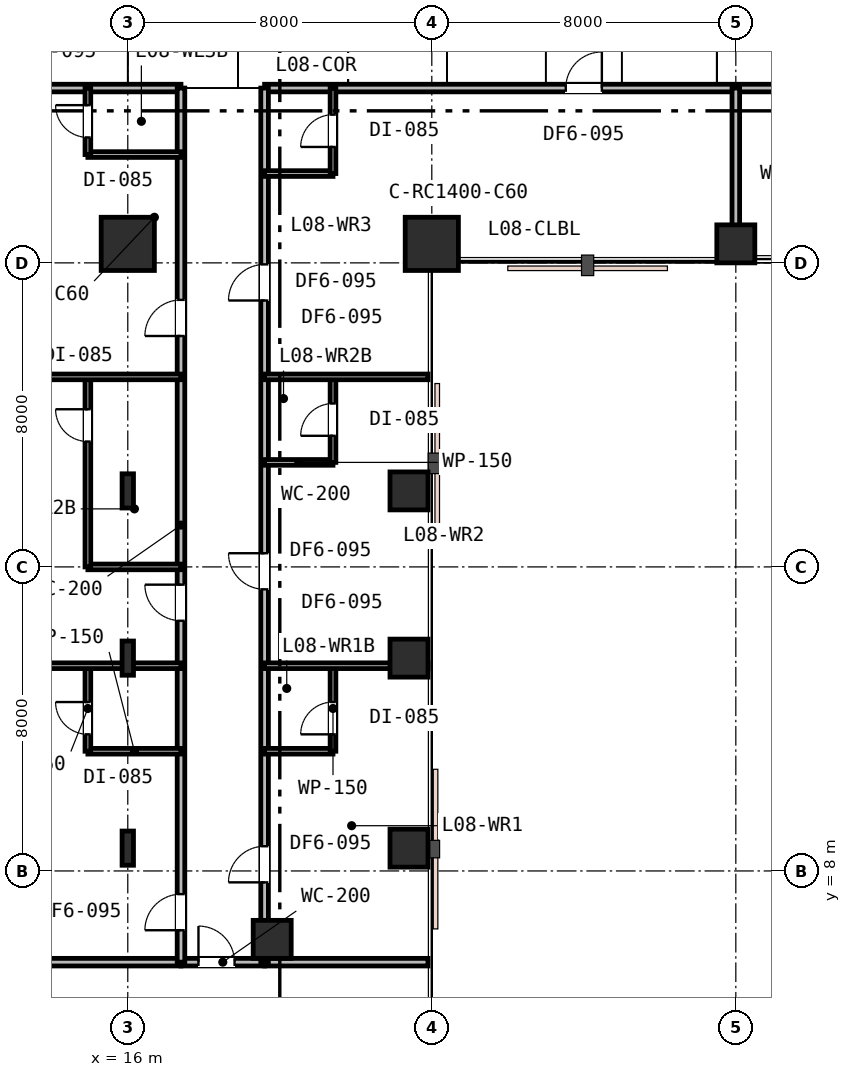
"""IFC4 building model, lengths in metres.
Left out: names, types, materials, properties, quantities, classifications, styles, units other than length and angle.
Written with IfcOpenShell. Run it as: python <this file> out.ifc"""

import sys

from ifc_helpers import new_model, si_unit, direction, frame, frame_2d, origin, origin_2d, place, context, subcontext, project, spatial, rectangle, i_section, extrude, element, fill, save


model = new_model("IFC4")
c1 = context("Model", 3, precision=1e-05, world=origin(), true_north=direction((0.0, 1.0)))
c2 = subcontext(c1, "Body", "Model", "MODEL_VIEW")
j1 = project(units=[si_unit("LENGTHUNIT", "METRE"), si_unit("PLANEANGLEUNIT", "RADIAN")], contexts=[c1])
p1 = place(None, origin())
s1 = spatial("IfcSite", under=j1, at=p1, CompositionType="ELEMENT")
p2 = place(p1, origin())
s2 = spatial("IfcBuilding", under=s1, at=p2, CompositionType="ELEMENT")
p3 = place(p2, frame((0.0, 0.0, 36.6)))
s3 = spatial("IfcBuildingStorey", under=s2, at=p3, CompositionType="ELEMENT", Elevation=36.6)
for number, where, z_axis, x_axis in (
    (1, (16.0, 24.5, 0.0), (0.0, 0.0, 1.0), (1.0, 0.0, 0.0)),
    (2, (24.0, 24.5, 0.0), (0.0, 0.0, 1.0), (1.0, 0.0, 0.0)),
):
    element("IfcColumn", number, at=place(p3, frame(where, z_axis=z_axis, x_axis=x_axis)), inside=s3, PredefinedType="COLUMN", context=c2, shape_type="SweptSolid", body=[
        extrude(rectangle(XDim=1.4, YDim=1.4, at=origin_2d()), origin(), (0.0, 0.0, 1.0), 3.6),
    ])
for number, where, z_axis, x_axis in (
    (3, (32.0, 24.5, 0.0), (0.0, 0.0, 1.0), (1.0, 0.0, 0.0)),
    (4, (19.8, 6.2, 0.0), (0.0, 0.0, 1.0), (1.0, 0.0, 0.0)),
    (5, (23.4, 8.6, 0.0), (0.0, 0.0, 1.0), (1.0, 0.0, 0.0)),
    (6, (23.4, 13.6, 0.0), (0.0, 0.0, 1.0), (1.0, 0.0, 0.0)),
    (7, (23.4, 18.0, 0.0), (0.0, 0.0, 1.0), (1.0, 0.0, 0.0)),
):
    element("IfcColumn", number, at=place(p3, frame(where, z_axis=z_axis, x_axis=x_axis)), inside=s3, PredefinedType="COLUMN", context=c2, shape_type="SweptSolid", body=[
        extrude(rectangle(XDim=1.0, YDim=1.0, at=origin_2d()), origin(), (0.0, 0.0, 1.0), 3.6),
    ])
for number, where, z_axis, x_axis in (
    (8, (16.0, 8.6, 0.0), (0.0, 0.0, 1.0), (1.0, 0.0, 0.0)),
    (9, (16.0, 13.6, 0.0), (0.0, 0.0, 1.0), (1.0, 0.0, 0.0)),
    (10, (16.0, 18.0, 0.0), (0.0, 0.0, 1.0), (1.0, 0.0, 0.0)),
):
    element("IfcColumn", number, at=place(p3, frame(where, z_axis=z_axis, x_axis=x_axis)), inside=s3, PredefinedType="COLUMN", context=c2, shape_type="SweptSolid", body=[
        extrude(i_section(OverallWidth=0.3, OverallDepth=0.9, WebThickness=0.018, FlangeThickness=0.035, FilletRadius=0.03, at=origin_2d()), origin(), (0.0, 0.0, 1.0), 3.6),
    ])
p4 = place(p3, frame((0.1, 28.6, 0.0), z_axis=(0.0, 0.0, 1.0), x_axis=(1.0, 0.0, 0.0)))
e11 = element("IfcWall", 11, at=p4, inside=s3, PredefinedType="PARTITIONING", context=c2, shape_type="SweptSolid", body=[
    extrude(rectangle(XDim=17.3, YDim=0.2, at=frame_2d((8.65, 0.0))), origin(), (0.0, 0.0, 1.0), 2.82),
])
p5 = place(p3, frame((19.6, 28.6, 0.0), z_axis=(0.0, 0.0, 1.0), x_axis=(1.0, 0.0, 0.0)))
e12 = element("IfcWall", 12, at=p5, inside=s3, PredefinedType="PARTITIONING", context=c2, shape_type="SweptSolid", body=[
    extrude(rectangle(XDim=30.8, YDim=0.2, at=frame_2d((15.4, 0.0))), origin(), (0.0, 0.0, 1.0), 2.82),
])
p6 = place(p5, frame((7.925, 0.0, 0.0)))
e13 = element("IfcOpeningElement", 13, at=p6, cuts=e12, PredefinedType="OPENING", context=c2, shape_type="SweptSolid", body=[
    extrude(rectangle(XDim=0.95, YDim=2.15, at=frame_2d((0.475, 1.075))), frame((0.0, 0.11, 0.0), z_axis=(0.0, -1.0, 0.0), x_axis=(1.0, 0.0, 0.0)), (0.0, 0.0, 1.0), 0.22),
])
p7 = place(p5, frame((16.39, 0.0, 0.0)))
e14 = element("IfcOpeningElement", 14, at=p7, cuts=e12, PredefinedType="OPENING", context=c2, shape_type="SweptSolid", body=[
    extrude(rectangle(XDim=0.95, YDim=2.15, at=frame_2d((0.475, 1.075))), frame((0.0, 0.11, 0.0), z_axis=(0.0, -1.0, 0.0), x_axis=(1.0, 0.0, 0.0)), (0.0, 0.0, 1.0), 0.22),
])
p8 = place(p5, frame((26.835, 0.0, 0.0)))
e15 = element("IfcOpeningElement", 15, at=p8, cuts=e12, PredefinedType="OPENING", context=c2, shape_type="SweptSolid", body=[
    extrude(rectangle(XDim=0.95, YDim=2.15, at=frame_2d((0.475, 1.075))), frame((0.0, 0.11, 0.0), z_axis=(0.0, -1.0, 0.0), x_axis=(1.0, 0.0, 0.0)), (0.0, 0.0, 1.0), 0.22),
])
p9 = place(p3, frame((32.0, 24.1, 0.0), z_axis=(0.0, 0.0, 1.0), x_axis=(0.0, 1.0, 0.0)))
e16 = element("IfcWall", 16, at=p9, inside=s3, PredefinedType="PARTITIONING", context=c2, shape_type="SweptSolid", body=[
    extrude(rectangle(XDim=4.5, YDim=0.2, at=frame_2d((2.25, 0.0))), origin(), (0.0, 0.0, 1.0), 2.93),
])
p10 = place(p3, frame((0.1, 5.6, 0.0), z_axis=(0.0, 0.0, 1.0), x_axis=(1.0, 0.0, 0.0)))
e17 = element("IfcWall", 17, at=p10, inside=s3, PredefinedType="PARTITIONING", context=c2, shape_type="SweptSolid", body=[
    extrude(rectangle(XDim=17.3, YDim=0.2, at=frame_2d((8.65, 0.0))), origin(), (0.0, 0.0, 1.0), 2.82),
])
p11 = place(p3, frame((19.6, 5.6, 0.0), z_axis=(0.0, 0.0, 1.0), x_axis=(1.0, 0.0, 0.0)))
e18 = element("IfcWall", 18, at=p11, inside=s3, PredefinedType="PARTITIONING", context=c2, shape_type="SweptSolid", body=[
    extrude(rectangle(XDim=4.3, YDim=0.2, at=frame_2d((2.15, 0.0))), origin(), (0.0, 0.0, 1.0), 3.33),
])
p12 = place(p3, frame((17.4, 5.6, 0.0), z_axis=(0.0, 0.0, 1.0), x_axis=(1.0, 0.0, 0.0)))
e19 = element("IfcWall", 19, at=p12, inside=s3, PredefinedType="PARTITIONING", context=c2, shape_type="SweptSolid", body=[
    extrude(rectangle(XDim=2.2, YDim=0.2, at=frame_2d((1.1, 0.0))), origin(), (0.0, 0.0, 1.0), 3.33),
])
p13 = place(p12, frame((0.46, 0.0, 0.0)))
e20 = element("IfcOpeningElement", 20, at=p13, cuts=e19, PredefinedType="OPENING", context=c2, shape_type="SweptSolid", body=[
    extrude(rectangle(XDim=0.95, YDim=2.15, at=frame_2d((0.475, 1.075))), frame((0.0, 0.11, 0.0), z_axis=(0.0, -1.0, 0.0), x_axis=(1.0, 0.0, 0.0)), (0.0, 0.0, 1.0), 0.22),
])
p14 = place(p3, frame((17.4, 5.6, 0.0), z_axis=(0.0, 0.0, 1.0), x_axis=(0.0, 1.0, 0.0)))
e21 = element("IfcWall", 21, at=p14, inside=s3, PredefinedType="PARTITIONING", context=c2, shape_type="SweptSolid", body=[
    extrude(rectangle(XDim=23.0, YDim=0.2, at=frame_2d((11.5, 0.0))), origin(), (0.0, 0.0, 1.0), 2.82),
])
p15 = place(p14, frame((0.84, 0.0, 0.0)))
e22 = element("IfcOpeningElement", 22, at=p15, cuts=e21, PredefinedType="OPENING", context=c2, shape_type="SweptSolid", body=[
    extrude(rectangle(XDim=0.95, YDim=2.15, at=frame_2d((0.475, 1.075))), frame((0.0, 0.11, 0.0), z_axis=(0.0, -1.0, 0.0), x_axis=(1.0, 0.0, 0.0)), (0.0, 0.0, 1.0), 0.22),
])
p16 = place(p14, frame((8.983, 0.0, 0.0)))
e23 = element("IfcOpeningElement", 23, at=p16, cuts=e21, PredefinedType="OPENING", context=c2, shape_type="SweptSolid", body=[
    extrude(rectangle(XDim=0.95, YDim=2.15, at=frame_2d((0.475, 1.075))), frame((0.0, 0.11, 0.0), z_axis=(0.0, -1.0, 0.0), x_axis=(1.0, 0.0, 0.0)), (0.0, 0.0, 1.0), 0.22),
])
p17 = place(p14, frame((16.476, 0.0, 0.0)))
e24 = element("IfcOpeningElement", 24, at=p17, cuts=e21, PredefinedType="OPENING", context=c2, shape_type="SweptSolid", body=[
    extrude(rectangle(XDim=0.95, YDim=2.15, at=frame_2d((0.475, 1.075))), frame((0.0, 0.11, 0.0), z_axis=(0.0, -1.0, 0.0), x_axis=(1.0, 0.0, 0.0)), (0.0, 0.0, 1.0), 0.22),
])
p18 = place(p3, frame((14.95, 11.15, 0.0), z_axis=(0.0, 0.0, 1.0), x_axis=(1.0, 0.0, 0.0)))
e25 = element("IfcWall", 25, at=p18, inside=s3, PredefinedType="PARTITIONING", context=c2, shape_type="SweptSolid", body=[
    extrude(rectangle(XDim=2.45, YDim=0.15, at=frame_2d((1.225, 0.0))), origin(), (0.0, 0.0, 1.0), 2.82),
])
p19 = place(p3, frame((14.95, 11.15, 0.0), z_axis=(0.0, 0.0, 1.0), x_axis=(0.0, 1.0, 0.0)))
e26 = element("IfcWall", 26, at=p19, inside=s3, PredefinedType="PARTITIONING", context=c2, shape_type="SweptSolid", body=[
    extrude(rectangle(XDim=2.25, YDim=0.15, at=frame_2d((1.125, 0.0))), origin(), (0.0, 0.0, 1.0), 2.82),
])
p20 = place(p19, frame((0.444, 0.0, 0.0)))
e27 = element("IfcOpeningElement", 27, at=p20, cuts=e26, PredefinedType="OPENING", context=c2, shape_type="SweptSolid", body=[
    extrude(rectangle(XDim=0.85, YDim=2.15, at=frame_2d((0.425, 1.075))), frame((0.0, 0.085, 0.0), z_axis=(0.0, -1.0, 0.0), x_axis=(1.0, 0.0, 0.0)), (0.0, 0.0, 1.0), 0.17),
])
p21 = place(p3, frame((0.1, 13.4, 0.0), z_axis=(0.0, 0.0, 1.0), x_axis=(1.0, 0.0, 0.0)))
e28 = element("IfcWall", 28, at=p21, inside=s3, PredefinedType="PARTITIONING", context=c2, shape_type="SweptSolid", body=[
    extrude(rectangle(XDim=17.3, YDim=0.15, at=frame_2d((8.65, 0.0))), origin(), (0.0, 0.0, 1.0), 2.82),
])
p22 = place(p3, frame((19.6, 5.6, 0.0), z_axis=(0.0, 0.0, 1.0), x_axis=(0.0, 1.0, 0.0)))
e29 = element("IfcWall", 29, at=p22, inside=s3, PredefinedType="PARTITIONING", context=c2, shape_type="SweptSolid", body=[
    extrude(rectangle(XDim=23.0, YDim=0.2, at=frame_2d((11.5, 0.0))), origin(), (0.0, 0.0, 1.0), 2.82),
])
p23 = place(p22, frame((2.1, 0.0, 0.0)))
e30 = element("IfcOpeningElement", 30, at=p23, cuts=e29, PredefinedType="OPENING", context=c2, shape_type="SweptSolid", body=[
    extrude(rectangle(XDim=0.95, YDim=2.15, at=frame_2d((0.475, 1.075))), frame((0.0, 0.11, 0.0), z_axis=(0.0, -1.0, 0.0), x_axis=(1.0, 0.0, 0.0)), (0.0, 0.0, 1.0), 0.22),
])
p24 = place(p22, frame((9.81, 0.0, 0.0)))
e31 = element("IfcOpeningElement", 31, at=p24, cuts=e29, PredefinedType="OPENING", context=c2, shape_type="SweptSolid", body=[
    extrude(rectangle(XDim=0.95, YDim=2.15, at=frame_2d((0.475, 1.075))), frame((0.0, 0.11, 0.0), z_axis=(0.0, -1.0, 0.0), x_axis=(1.0, 0.0, 0.0)), (0.0, 0.0, 1.0), 0.22),
])
p25 = place(p22, frame((17.41, 0.0, 0.0)))
e32 = element("IfcOpeningElement", 32, at=p25, cuts=e29, PredefinedType="OPENING", context=c2, shape_type="SweptSolid", body=[
    extrude(rectangle(XDim=0.95, YDim=2.15, at=frame_2d((0.475, 1.075))), frame((0.0, 0.11, 0.0), z_axis=(0.0, -1.0, 0.0), x_axis=(1.0, 0.0, 0.0)), (0.0, 0.0, 1.0), 0.22),
])
p26 = place(p3, frame((19.6, 11.15, 0.0), z_axis=(0.0, 0.0, 1.0), x_axis=(1.0, 0.0, 0.0)))
e33 = element("IfcWall", 33, at=p26, inside=s3, PredefinedType="PARTITIONING", context=c2, shape_type="SweptSolid", body=[
    extrude(rectangle(XDim=1.8, YDim=0.15, at=frame_2d((0.9, 0.0))), origin(), (0.0, 0.0, 1.0), 2.96),
])
p27 = place(p3, frame((21.4, 11.15, 0.0), z_axis=(0.0, 0.0, 1.0), x_axis=(0.0, 1.0, 0.0)))
e34 = element("IfcWall", 34, at=p27, inside=s3, PredefinedType="PARTITIONING", context=c2, shape_type="SweptSolid", body=[
    extrude(rectangle(XDim=2.25, YDim=0.15, at=frame_2d((1.125, 0.0))), origin(), (0.0, 0.0, 1.0), 2.82),
])
p28 = place(p27, frame((0.444, 0.0, 0.0)))
e35 = element("IfcOpeningElement", 35, at=p28, cuts=e34, PredefinedType="OPENING", context=c2, shape_type="SweptSolid", body=[
    extrude(rectangle(XDim=0.85, YDim=2.15, at=frame_2d((0.425, 1.075))), frame((0.0, 0.085, 0.0), z_axis=(0.0, -1.0, 0.0), x_axis=(1.0, 0.0, 0.0)), (0.0, 0.0, 1.0), 0.17),
])
p29 = place(p3, frame((19.6, 13.4, 0.0), z_axis=(0.0, 0.0, 1.0), x_axis=(1.0, 0.0, 0.0)))
e36 = element("IfcWall", 36, at=p29, inside=s3, PredefinedType="PARTITIONING", context=c2, shape_type="SweptSolid", body=[
    extrude(rectangle(XDim=4.3, YDim=0.15, at=frame_2d((2.15, 0.0))), origin(), (0.0, 0.0, 1.0), 2.82),
])
p30 = place(p3, frame((14.95, 16.0, 0.0), z_axis=(0.0, 0.0, 1.0), x_axis=(1.0, 0.0, 0.0)))
e37 = element("IfcWall", 37, at=p30, inside=s3, PredefinedType="PARTITIONING", context=c2, shape_type="SweptSolid", body=[
    extrude(rectangle(XDim=2.45, YDim=0.15, at=frame_2d((1.225, 0.0))), origin(), (0.0, 0.0, 1.0), 2.82),
])
p31 = place(p3, frame((14.95, 16.0, 0.0), z_axis=(0.0, 0.0, 1.0), x_axis=(0.0, 1.0, 0.0)))
e38 = element("IfcWall", 38, at=p31, inside=s3, PredefinedType="PARTITIONING", context=c2, shape_type="SweptSolid", body=[
    extrude(rectangle(XDim=5.0, YDim=0.15, at=frame_2d((2.5, 0.0))), origin(), (0.0, 0.0, 1.0), 2.82),
])
p32 = place(p31, frame((3.298, 0.0, 0.0)))
e39 = element("IfcOpeningElement", 39, at=p32, cuts=e38, PredefinedType="OPENING", context=c2, shape_type="SweptSolid", body=[
    extrude(rectangle(XDim=0.85, YDim=2.15, at=frame_2d((0.425, 1.075))), frame((0.0, 0.085, 0.0), z_axis=(0.0, -1.0, 0.0), x_axis=(1.0, 0.0, 0.0)), (0.0, 0.0, 1.0), 0.17),
])
p33 = place(p3, frame((0.1, 21.0, 0.0), z_axis=(0.0, 0.0, 1.0), x_axis=(1.0, 0.0, 0.0)))
e40 = element("IfcWall", 40, at=p33, inside=s3, PredefinedType="PARTITIONING", context=c2, shape_type="SweptSolid", body=[
    extrude(rectangle(XDim=17.3, YDim=0.15, at=frame_2d((8.65, 0.0))), origin(), (0.0, 0.0, 1.0), 2.82),
])
p34 = place(p3, frame((19.6, 18.75, 0.0), z_axis=(0.0, 0.0, 1.0), x_axis=(1.0, 0.0, 0.0)))
e41 = element("IfcWall", 41, at=p34, inside=s3, PredefinedType="PARTITIONING", context=c2, shape_type="SweptSolid", body=[
    extrude(rectangle(XDim=1.8, YDim=0.15, at=frame_2d((0.9, 0.0))), origin(), (0.0, 0.0, 1.0), 3.33),
])
p35 = place(p3, frame((21.4, 18.75, 0.0), z_axis=(0.0, 0.0, 1.0), x_axis=(0.0, 1.0, 0.0)))
e42 = element("IfcWall", 42, at=p35, inside=s3, PredefinedType="PARTITIONING", context=c2, shape_type="SweptSolid", body=[
    extrude(rectangle(XDim=2.25, YDim=0.15, at=frame_2d((1.125, 0.0))), origin(), (0.0, 0.0, 1.0), 3.33),
])
p36 = place(p35, frame((0.7, 0.0, 0.0)))
e43 = element("IfcOpeningElement", 43, at=p36, cuts=e42, PredefinedType="OPENING", context=c2, shape_type="SweptSolid", body=[
    extrude(rectangle(XDim=0.85, YDim=2.15, at=frame_2d((0.425, 1.075))), frame((0.0, 0.085, 0.0), z_axis=(0.0, -1.0, 0.0), x_axis=(1.0, 0.0, 0.0)), (0.0, 0.0, 1.0), 0.17),
])
p37 = place(p3, frame((19.6, 21.0, 0.0), z_axis=(0.0, 0.0, 1.0), x_axis=(1.0, 0.0, 0.0)))
e44 = element("IfcWall", 44, at=p37, inside=s3, PredefinedType="PARTITIONING", context=c2, shape_type="SweptSolid", body=[
    extrude(rectangle(XDim=4.3, YDim=0.15, at=frame_2d((2.15, 0.0))), origin(), (0.0, 0.0, 1.0), 3.33),
])
p38 = place(p3, frame((14.95, 26.85, 0.0), z_axis=(0.0, 0.0, 1.0), x_axis=(1.0, 0.0, 0.0)))
e45 = element("IfcWall", 45, at=p38, inside=s3, PredefinedType="PARTITIONING", context=c2, shape_type="SweptSolid", body=[
    extrude(rectangle(XDim=2.45, YDim=0.15, at=frame_2d((1.225, 0.0))), origin(), (0.0, 0.0, 1.0), 2.82),
])
p39 = place(p3, frame((14.95, 26.85, 0.0), z_axis=(0.0, 0.0, 1.0), x_axis=(0.0, 1.0, 0.0)))
e46 = element("IfcWall", 46, at=p39, inside=s3, PredefinedType="PARTITIONING", context=c2, shape_type="SweptSolid", body=[
    extrude(rectangle(XDim=1.75, YDim=0.15, at=frame_2d((0.875, 0.0))), origin(), (0.0, 0.0, 1.0), 3.33),
])
p40 = place(p39, frame((0.45, 0.0, 0.0)))
e47 = element("IfcOpeningElement", 47, at=p40, cuts=e46, PredefinedType="OPENING", context=c2, shape_type="SweptSolid", body=[
    extrude(rectangle(XDim=0.85, YDim=2.15, at=frame_2d((0.425, 1.075))), frame((0.0, 0.085, 0.0), z_axis=(0.0, -1.0, 0.0), x_axis=(1.0, 0.0, 0.0)), (0.0, 0.0, 1.0), 0.17),
])
p41 = place(p3, frame((19.6, 26.35, 0.0), z_axis=(0.0, 0.0, 1.0), x_axis=(1.0, 0.0, 0.0)))
e48 = element("IfcWall", 48, at=p41, inside=s3, PredefinedType="PARTITIONING", context=c2, shape_type="SweptSolid", body=[
    extrude(rectangle(XDim=1.8, YDim=0.15, at=frame_2d((0.9, 0.0))), origin(), (0.0, 0.0, 1.0), 2.96),
])
p42 = place(p3, frame((21.4, 26.35, 0.0), z_axis=(0.0, 0.0, 1.0), x_axis=(0.0, 1.0, 0.0)))
e49 = element("IfcWall", 49, at=p42, inside=s3, PredefinedType="PARTITIONING", context=c2, shape_type="SweptSolid", body=[
    extrude(rectangle(XDim=2.25, YDim=0.15, at=frame_2d((1.125, 0.0))), origin(), (0.0, 0.0, 1.0), 2.96),
])
p43 = place(p42, frame((0.7, 0.0, 0.0)))
e50 = element("IfcOpeningElement", 50, at=p43, cuts=e49, PredefinedType="OPENING", context=c2, shape_type="SweptSolid", body=[
    extrude(rectangle(XDim=0.85, YDim=2.15, at=frame_2d((0.425, 1.075))), frame((0.0, 0.085, 0.0), z_axis=(0.0, -1.0, 0.0), x_axis=(1.0, 0.0, 0.0)), (0.0, 0.0, 1.0), 0.17),
])
p44 = place(p6, origin())
e51 = element("IfcDoor", 51, at=p44, inside=s3, OperationType="SINGLE_SWING_RIGHT", PredefinedType="DOOR", context=c2, shape_type="SweptSolid", body=[
    extrude(rectangle(XDim=0.95, YDim=2.15, at=frame_2d((0.475, 1.075))), frame((0.0, 0.025, 0.0), z_axis=(0.0, -1.0, 0.0), x_axis=(1.0, 0.0, 0.0)), (0.0, 0.0, 1.0), 0.05),
])
fill(e13, e51)
p45 = place(p13, origin())
e52 = element("IfcDoor", 52, at=p45, inside=s3, OperationType="SINGLE_SWING_LEFT", PredefinedType="DOOR", context=c2, shape_type="SweptSolid", body=[
    extrude(rectangle(XDim=0.95, YDim=2.15, at=frame_2d((0.475, 1.075))), frame((0.0, 0.025, 0.0), z_axis=(0.0, -1.0, 0.0), x_axis=(1.0, 0.0, 0.0)), (0.0, 0.0, 1.0), 0.05),
])
fill(e20, e52)
p46 = place(p15, origin())
e53 = element("IfcDoor", 53, at=p46, inside=s3, OperationType="SINGLE_SWING_LEFT", PredefinedType="DOOR", context=c2, shape_type="SweptSolid", body=[
    extrude(rectangle(XDim=0.95, YDim=2.15, at=frame_2d((0.475, 1.075))), frame((0.0, 0.025, 0.0), z_axis=(0.0, -1.0, 0.0), x_axis=(1.0, 0.0, 0.0)), (0.0, 0.0, 1.0), 0.05),
])
fill(e22, e53)
p47 = place(p20, origin())
e54 = element("IfcDoor", 54, at=p47, inside=s3, OperationType="SINGLE_SWING_RIGHT", PredefinedType="DOOR", context=c2, shape_type="SweptSolid", body=[
    extrude(rectangle(XDim=0.85, YDim=2.15, at=frame_2d((0.425, 1.075))), frame((0.0, 0.025, 0.0), z_axis=(0.0, -1.0, 0.0), x_axis=(1.0, 0.0, 0.0)), (0.0, 0.0, 1.0), 0.05),
])
fill(e27, e54)
p48 = place(p23, origin())
e55 = element("IfcDoor", 55, at=p48, inside=s3, OperationType="SINGLE_SWING_LEFT", PredefinedType="DOOR", context=c2, shape_type="SweptSolid", body=[
    extrude(rectangle(XDim=0.95, YDim=2.15, at=frame_2d((0.475, 1.075))), frame((0.0, 0.025, 0.0), z_axis=(0.0, -1.0, 0.0), x_axis=(1.0, 0.0, 0.0)), (0.0, 0.0, 1.0), 0.05),
])
fill(e30, e55)
p49 = place(p28, origin())
e56 = element("IfcDoor", 56, at=p49, inside=s3, OperationType="SINGLE_SWING_LEFT", PredefinedType="DOOR", context=c2, shape_type="SweptSolid", body=[
    extrude(rectangle(XDim=0.85, YDim=2.15, at=frame_2d((0.425, 1.075))), frame((0.0, 0.025, 0.0), z_axis=(0.0, -1.0, 0.0), x_axis=(1.0, 0.0, 0.0)), (0.0, 0.0, 1.0), 0.05),
])
fill(e35, e56)
p50 = place(p16, origin())
e57 = element("IfcDoor", 57, at=p50, inside=s3, OperationType="SINGLE_SWING_RIGHT", PredefinedType="DOOR", context=c2, shape_type="SweptSolid", body=[
    extrude(rectangle(XDim=0.95, YDim=2.15, at=frame_2d((0.475, 1.075))), frame((0.0, 0.025, 0.0), z_axis=(0.0, -1.0, 0.0), x_axis=(1.0, 0.0, 0.0)), (0.0, 0.0, 1.0), 0.05),
])
fill(e23, e57)
p51 = place(p32, origin())
e58 = element("IfcDoor", 58, at=p51, inside=s3, OperationType="SINGLE_SWING_RIGHT", PredefinedType="DOOR", context=c2, shape_type="SweptSolid", body=[
    extrude(rectangle(XDim=0.85, YDim=2.15, at=frame_2d((0.425, 1.075))), frame((0.0, 0.025, 0.0), z_axis=(0.0, -1.0, 0.0), x_axis=(1.0, 0.0, 0.0)), (0.0, 0.0, 1.0), 0.05),
])
fill(e39, e58)
p52 = place(p24, origin())
e59 = element("IfcDoor", 59, at=p52, inside=s3, OperationType="SINGLE_SWING_RIGHT", PredefinedType="DOOR", context=c2, shape_type="SweptSolid", body=[
    extrude(rectangle(XDim=0.95, YDim=2.15, at=frame_2d((0.475, 1.075))), frame((0.0, 0.025, 0.0), z_axis=(0.0, -1.0, 0.0), x_axis=(1.0, 0.0, 0.0)), (0.0, 0.0, 1.0), 0.05),
])
fill(e31, e59)
p53 = place(p36, origin())
e60 = element("IfcDoor", 60, at=p53, inside=s3, OperationType="SINGLE_SWING_LEFT", PredefinedType="DOOR", context=c2, shape_type="SweptSolid", body=[
    extrude(rectangle(XDim=0.85, YDim=2.15, at=frame_2d((0.425, 1.075))), frame((0.0, 0.025, 0.0), z_axis=(0.0, -1.0, 0.0), x_axis=(1.0, 0.0, 0.0)), (0.0, 0.0, 1.0), 0.05),
])
fill(e43, e60)
p54 = place(p17, origin())
e61 = element("IfcDoor", 61, at=p54, inside=s3, OperationType="SINGLE_SWING_LEFT", PredefinedType="DOOR", context=c2, shape_type="SweptSolid", body=[
    extrude(rectangle(XDim=0.95, YDim=2.15, at=frame_2d((0.475, 1.075))), frame((0.0, 0.025, 0.0), z_axis=(0.0, -1.0, 0.0), x_axis=(1.0, 0.0, 0.0)), (0.0, 0.0, 1.0), 0.05),
])
fill(e24, e61)
p55 = place(p40, origin())
e62 = element("IfcDoor", 62, at=p55, inside=s3, OperationType="SINGLE_SWING_RIGHT", PredefinedType="DOOR", context=c2, shape_type="SweptSolid", body=[
    extrude(rectangle(XDim=0.85, YDim=2.15, at=frame_2d((0.425, 1.075))), frame((0.0, 0.025, 0.0), z_axis=(0.0, -1.0, 0.0), x_axis=(1.0, 0.0, 0.0)), (0.0, 0.0, 1.0), 0.05),
])
fill(e47, e62)
p56 = place(p25, origin())
e63 = element("IfcDoor", 63, at=p56, inside=s3, OperationType="SINGLE_SWING_LEFT", PredefinedType="DOOR", context=c2, shape_type="SweptSolid", body=[
    extrude(rectangle(XDim=0.95, YDim=2.15, at=frame_2d((0.475, 1.075))), frame((0.0, 0.025, 0.0), z_axis=(0.0, -1.0, 0.0), x_axis=(1.0, 0.0, 0.0)), (0.0, 0.0, 1.0), 0.05),
])
fill(e32, e63)
p57 = place(p43, origin())
e64 = element("IfcDoor", 64, at=p57, inside=s3, OperationType="SINGLE_SWING_LEFT", PredefinedType="DOOR", context=c2, shape_type="SweptSolid", body=[
    extrude(rectangle(XDim=0.85, YDim=2.15, at=frame_2d((0.425, 1.075))), frame((0.0, 0.025, 0.0), z_axis=(0.0, -1.0, 0.0), x_axis=(1.0, 0.0, 0.0)), (0.0, 0.0, 1.0), 0.05),
])
fill(e50, e64)
save(model, sys.argv[1])
